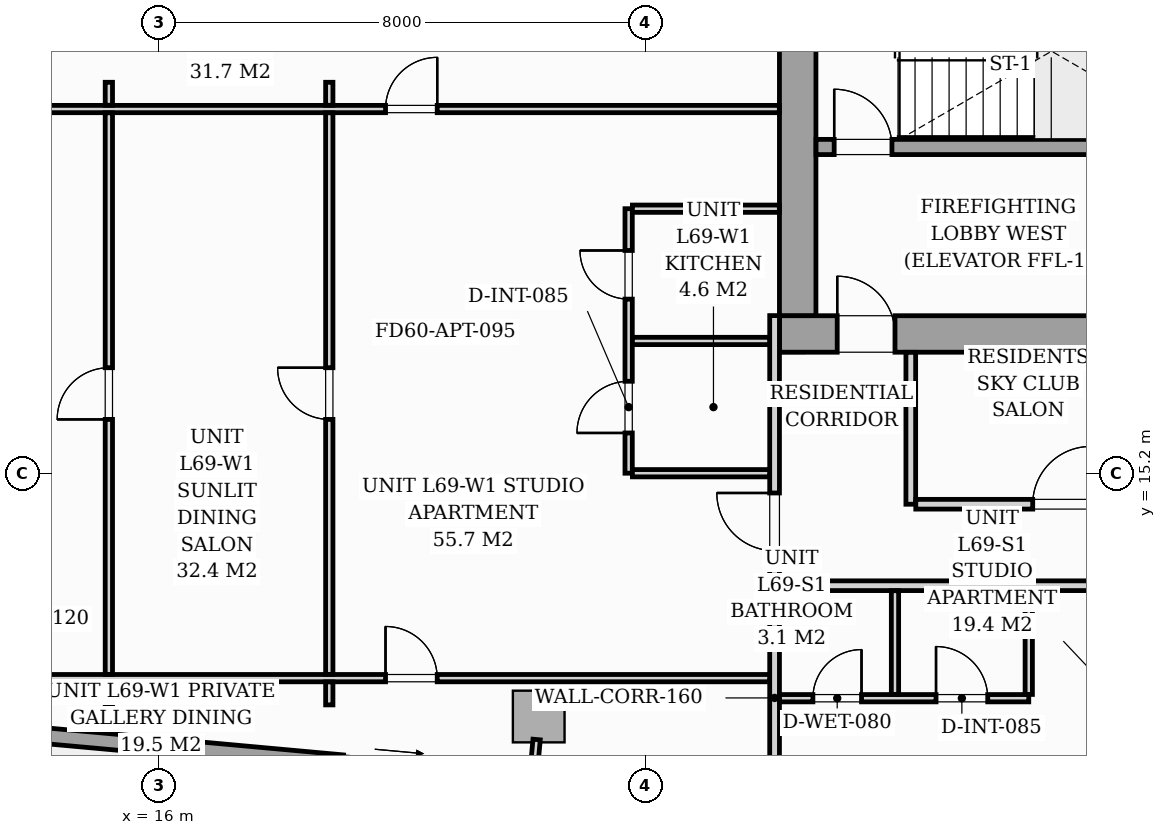
"""IFC4 building model, lengths in metres.
Left out: names, types, materials, properties, quantities, classifications, styles, units other than length and angle.
Written with IfcOpenShell. Run it as: python <this file> out.ifc"""

import sys

from ifc_helpers import new_model, si_unit, direction, frame, frame_2d, origin, origin_2d, place, context, subcontext, project, spatial, rectangle, i_section, extrude, source, transform, mapped, element, fill, save


model = new_model("IFC4")
c1 = context("Model", 3, precision=1e-05, world=origin(), true_north=direction((0.0, 1.0)))
c2 = subcontext(c1, "Body", "Model", "MODEL_VIEW")
j1 = project(units=[si_unit("LENGTHUNIT", "METRE"), si_unit("PLANEANGLEUNIT", "RADIAN")], contexts=[c1])
p1 = place(None, origin())
s1 = spatial("IfcSite", under=j1, at=p1, CompositionType="ELEMENT")
p2 = place(p1, origin())
s2 = spatial("IfcBuilding", under=s1, at=p2, CompositionType="ELEMENT")
p3 = place(p2, frame((0.0, 0.0, 239.7)))
s3 = spatial("IfcBuildingStorey", under=s2, at=p3, CompositionType="ELEMENT", Elevation=239.7)
m1 = source(origin(), c2, "Body", "SweptSolid", [
    extrude(i_section(OverallWidth=0.409, OverallDepth=0.425, WebThickness=0.033, FlangeThickness=0.052, FilletRadius=0.018, at=origin_2d()), origin(), (0.0, 0.0, 1.0), 3.296),
])
p4 = place(p3, frame((26.4, 17.4, 0.002), z_axis=(0.0, 0.0, 1.0), x_axis=(1.0, 0.0, 0.0)))
e1 = element("IfcColumn", 1, at=p4, inside=s3, PredefinedType="PILASTER", context=c2, shape_type="MappedRepresentation", body=[
    mapped(m1, transform((0.0, 0.0, 0.0), scale=1.0)),
])
m2 = source(origin(), c2, "Body", "SweptSolid", [
    extrude(rectangle(XDim=0.85, YDim=0.85, at=origin_2d()), origin(), (0.0, 0.0, 1.0), 3.296),
])
p5 = place(p3, frame((22.241, 11.209, 0.002), z_axis=(0.0, 0.0, 1.0), x_axis=(0.995884398616, -0.090632580198, 0.0)))
e2 = element("IfcColumn", 2, at=p5, inside=s3, PredefinedType="COLUMN", context=c2, shape_type="MappedRepresentation", body=[
    mapped(m2, transform((0.0, 0.0, 0.0), scale=1.0)),
])
p6 = place(p3, frame((25.761, 9.834, 0.0), z_axis=(0.0, 0.0, 1.0), x_axis=(-0.995884584572, 0.090630536861, 0.0)))
e3 = element("IfcWall", 3, at=p6, inside=s3, PredefinedType="STANDARD", context=c2, shape_type="SweptSolid", body=[
    extrude(rectangle(XDim=14.63, YDim=0.26, at=frame_2d((7.315, 0.0))), origin(), (0.0, 0.0, 1.0), 3.04),
])
p7 = place(p6, frame((4.97, 0.0, 0.0)))
e4 = element("IfcOpeningElement", 4, at=p7, cuts=e3, PredefinedType="OPENING", context=c2, shape_type="SweptSolid", body=[
    extrude(rectangle(XDim=1.8, YDim=2.06, at=frame_2d((0.9, 1.03))), frame((0.0, 0.14, 0.0), z_axis=(0.0, -1.0, 0.0), x_axis=(1.0, 0.0, 0.0)), (0.0, 0.0, 1.0), 0.28),
])
p8 = place(p6, frame((0.7, 0.0, 0.65)))
e5 = element("IfcOpeningElement", 5, at=p8, cuts=e3, PredefinedType="OPENING", context=c2, shape_type="SweptSolid", body=[
    extrude(rectangle(XDim=1.6, YDim=1.5, at=frame_2d((0.8, 0.75))), frame((0.0, 0.14, 0.0), z_axis=(0.0, -1.0, 0.0), x_axis=(1.0, 0.0, 0.0)), (0.0, 0.0, 1.0), 0.28),
])
p9 = place(p3, frame((26.2, 17.5, 0.0), z_axis=(0.0, 0.0, 1.0), x_axis=(1.0, 0.0, 0.0)))
e6 = element("IfcWall", 6, at=p9, inside=s3, PredefinedType="SHEAR", context=c2, shape_type="SweptSolid", body=[
    extrude(rectangle(XDim=19.6, YDim=0.6, at=frame_2d((9.8, 0.0))), origin(), (0.0, 0.0, 1.0), 3.3),
])
p10 = place(p9, frame((0.95, 0.0, 0.0)))
e7 = element("IfcOpeningElement", 7, at=p10, cuts=e6, PredefinedType="OPENING", context=c2, shape_type="SweptSolid", body=[
    extrude(rectangle(XDim=0.95, YDim=2.06, at=frame_2d((0.475, 1.03))), frame((0.0, 0.31, 0.0), z_axis=(0.0, -1.0, 0.0), x_axis=(1.0, 0.0, 0.0)), (0.0, 0.0, 1.0), 0.62),
])
p11 = place(p9, frame((9.38, 0.0, 0.0)))
e8 = element("IfcOpeningElement", 8, at=p11, cuts=e6, PredefinedType="OPENING", context=c2, shape_type="SweptSolid", body=[
    extrude(rectangle(XDim=0.85, YDim=2.0, at=frame_2d((0.425, 1.0))), frame((0.0, 0.31, 0.0), z_axis=(0.0, -1.0, 0.0), x_axis=(1.0, 0.0, 0.0)), (0.0, 0.0, 1.0), 0.62),
])
p12 = place(p9, frame((17.55, 0.0, 0.0)))
e9 = element("IfcOpeningElement", 9, at=p12, cuts=e6, PredefinedType="OPENING", context=c2, shape_type="SweptSolid", body=[
    extrude(rectangle(XDim=0.95, YDim=2.06, at=frame_2d((0.475, 1.03))), frame((0.0, 0.31, 0.0), z_axis=(0.0, -1.0, 0.0), x_axis=(1.0, 0.0, 0.0)), (0.0, 0.0, 1.0), 0.62),
])
p13 = place(p3, frame((26.5, 17.802, 0.0), z_axis=(0.0, 0.0, 1.0), x_axis=(0.0, 1.0, 0.0)))
e10 = element("IfcWall", 10, at=p13, inside=s3, PredefinedType="SHEAR", context=c2, shape_type="SweptSolid", body=[
    extrude(rectangle(XDim=5.796, YDim=0.6, at=frame_2d((2.898, 0.0))), origin(), (0.0, 0.0, 1.0), 3.3),
])
p14 = place(p3, frame((26.802, 20.575, 0.0), z_axis=(0.0, 0.0, 1.0), x_axis=(1.0, 0.0, 0.0)))
e11 = element("IfcWall", 11, at=p14, inside=s3, PredefinedType="SOLIDWALL", context=c2, shape_type="SweptSolid", body=[
    extrude(rectangle(XDim=8.148, YDim=0.25, at=frame_2d((4.074, 0.0))), origin(), (0.0, 0.0, 1.0), 3.3),
])
p15 = place(p14, frame((0.298, 0.0, 0.0)))
e12 = element("IfcOpeningElement", 12, at=p15, cuts=e11, PredefinedType="OPENING", context=c2, shape_type="SweptSolid", body=[
    extrude(rectangle(XDim=0.95, YDim=2.06, at=frame_2d((0.475, 1.03))), frame((0.0, 0.135, 0.0), z_axis=(0.0, -1.0, 0.0), x_axis=(1.0, 0.0, 0.0)), (0.0, 0.0, 1.0), 0.27),
])
p16 = place(p3, frame((26.12, 13.36, 0.0), z_axis=(0.0, 0.0, 1.0), x_axis=(1.0, 0.0, 0.0)))
e13 = element("IfcWall", 13, at=p16, inside=s3, PredefinedType="PARTITIONING", context=c2, shape_type="SweptSolid", body=[
    extrude(rectangle(XDim=19.76, YDim=0.16, at=frame_2d((9.88, 0.0))), origin(), (0.0, 0.0, 1.0), 2.605),
])
p17 = place(p16, frame((5.221, 0.0, 0.0)))
e14 = element("IfcOpeningElement", 14, at=p17, cuts=e13, PredefinedType="OPENING", context=c2, shape_type="SweptSolid", body=[
    extrude(rectangle(XDim=0.95, YDim=2.06, at=frame_2d((0.475, 1.03))), frame((0.0, 0.09, 0.0), z_axis=(0.0, -1.0, 0.0), x_axis=(1.0, 0.0, 0.0)), (0.0, 0.0, 1.0), 0.18),
])
p18 = place(p16, frame((8.074, 0.0, 0.0)))
e15 = element("IfcOpeningElement", 15, at=p18, cuts=e13, PredefinedType="OPENING", context=c2, shape_type="SweptSolid", body=[
    extrude(rectangle(XDim=0.95, YDim=2.06, at=frame_2d((0.475, 1.03))), frame((0.0, 0.09, 0.0), z_axis=(0.0, -1.0, 0.0), x_axis=(1.0, 0.0, 0.0)), (0.0, 0.0, 1.0), 0.18),
])
p19 = place(p16, frame((18.17, 0.0, 0.0)))
e16 = element("IfcOpeningElement", 16, at=p19, cuts=e13, PredefinedType="OPENING", context=c2, shape_type="SweptSolid", body=[
    extrude(rectangle(XDim=0.95, YDim=2.06, at=frame_2d((0.475, 1.03))), frame((0.0, 0.09, 0.0), z_axis=(0.0, -1.0, 0.0), x_axis=(1.0, 0.0, 0.0)), (0.0, 0.0, 1.0), 0.18),
])
p20 = place(p3, frame((26.12, 9.751, 0.0), z_axis=(0.0, 0.0, 1.0), x_axis=(0.0, 1.0, 0.0)))
e17 = element("IfcWall", 17, at=p20, inside=s3, PredefinedType="PARTITIONING", context=c2, shape_type="SweptSolid", body=[
    extrude(rectangle(XDim=3.527, YDim=0.16, at=frame_2d((1.763, 0.0))), origin(), (0.0, 0.0, 1.0), 3.04),
])
p21 = place(p3, frame((26.12, 13.442, 0.0), z_axis=(0.0, 0.0, 1.0), x_axis=(0.0, 1.0, 0.0)))
e18 = element("IfcWall", 18, at=p21, inside=s3, PredefinedType="PARTITIONING", context=c2, shape_type="SweptSolid", body=[
    extrude(rectangle(XDim=4.36, YDim=0.16, at=frame_2d((2.18, 0.0))), origin(), (0.0, 0.0, 1.0), 3.04),
])
p22 = place(p21, frame((0.493, 0.0, 0.0)))
e19 = element("IfcOpeningElement", 19, at=p22, cuts=e18, PredefinedType="OPENING", context=c2, shape_type="SweptSolid", body=[
    extrude(rectangle(XDim=0.95, YDim=2.06, at=frame_2d((0.475, 1.03))), frame((0.0, 0.09, 0.0), z_axis=(0.0, -1.0, 0.0), x_axis=(1.0, 0.0, 0.0)), (0.0, 0.0, 1.0), 0.18),
])
p23 = place(p3, frame((26.202, 11.51, 0.0), z_axis=(0.0, 0.0, 1.0), x_axis=(1.0, 0.0, 0.0)))
e20 = element("IfcWall", 20, at=p23, inside=s3, PredefinedType="PARTITIONING", context=c2, shape_type="SweptSolid", body=[
    extrude(rectangle(XDim=4.098, YDim=0.12, at=frame_2d((2.049, 0.0))), origin(), (0.0, 0.0, 1.0), 2.605),
])
p24 = place(p23, frame((0.548, 0.0, 0.0)))
e21 = element("IfcOpeningElement", 21, at=p24, cuts=e20, PredefinedType="OPENING", context=c2, shape_type="SweptSolid", body=[
    extrude(rectangle(XDim=0.8, YDim=2.02, at=frame_2d((0.4, 1.01))), frame((0.0, 0.07, 0.0), z_axis=(0.0, -1.0, 0.0), x_axis=(1.0, 0.0, 0.0)), (0.0, 0.0, 1.0), 0.14),
])
p25 = place(p23, frame((2.573, 0.0, 0.0)))
e22 = element("IfcOpeningElement", 22, at=p25, cuts=e20, PredefinedType="OPENING", context=c2, shape_type="SweptSolid", body=[
    extrude(rectangle(XDim=0.85, YDim=2.05, at=frame_2d((0.425, 1.025))), frame((0.0, 0.07, 0.0), z_axis=(0.0, -1.0, 0.0), x_axis=(1.0, 0.0, 0.0)), (0.0, 0.0, 1.0), 0.14),
])
for number, where, z_axis, x_axis in (
    (23, (30.3, 11.572, 0.0), (0.0, 0.0, 1.0), (0.0, 1.0, 0.0)),
    (24, (28.1, 11.572, 0.0), (0.0, 0.0, 1.0), (0.0, 1.0, 0.0)),
):
    element("IfcWall", number, at=place(p3, frame(where, z_axis=z_axis, x_axis=x_axis)), inside=s3, PredefinedType="PARTITIONING", context=c2, shape_type="SweptSolid", body=[
        extrude(rectangle(XDim=1.706, YDim=0.12, at=frame_2d((0.853, 0.0))), origin(), (0.0, 0.0, 1.0), 3.04),
    ])
p26 = place(p3, frame((23.72, 15.21, 0.0), z_axis=(0.0, 0.0, 1.0), x_axis=(0.0, 1.0, 0.0)))
e25 = element("IfcWall", 25, at=p26, inside=s3, PredefinedType="PARTITIONING", context=c2, shape_type="SweptSolid", body=[
    extrude(rectangle(XDim=4.35, YDim=0.12, at=frame_2d((2.175, 0.0))), origin(), (0.0, 0.0, 1.0), 3.04),
])
p27 = place(p26, frame((0.662, 0.0, 0.0)))
e26 = element("IfcOpeningElement", 26, at=p27, cuts=e25, PredefinedType="OPENING", context=c2, shape_type="SweptSolid", body=[
    extrude(rectangle(XDim=0.85, YDim=2.05, at=frame_2d((0.425, 1.025))), frame((0.0, 0.07, 0.0), z_axis=(0.0, -1.0, 0.0), x_axis=(1.0, 0.0, 0.0)), (0.0, 0.0, 1.0), 0.14),
])
p28 = place(p26, frame((2.863, 0.0, 0.0)))
e27 = element("IfcOpeningElement", 27, at=p28, cuts=e25, PredefinedType="OPENING", context=c2, shape_type="SweptSolid", body=[
    extrude(rectangle(XDim=0.8, YDim=2.02, at=frame_2d((0.4, 1.01))), frame((0.0, 0.07, 0.0), z_axis=(0.0, -1.0, 0.0), x_axis=(1.0, 0.0, 0.0)), (0.0, 0.0, 1.0), 0.14),
])
p29 = place(p3, frame((23.782, 17.385, 0.0), z_axis=(0.0, 0.0, 1.0), x_axis=(1.0, 0.0, 0.0)))
e28 = element("IfcWall", 28, at=p29, inside=s3, PredefinedType="PARTITIONING", context=c2, shape_type="SweptSolid", body=[
    extrude(rectangle(XDim=2.256, YDim=0.12, at=frame_2d((1.128, 0.0))), origin(), (0.0, 0.0, 1.0), 2.381),
])
p30 = place(p3, frame((23.782, 15.21, 0.0), z_axis=(0.0, 0.0, 1.0), x_axis=(1.0, 0.0, 0.0)))
e29 = element("IfcWall", 29, at=p30, inside=s3, PredefinedType="PARTITIONING", context=c2, shape_type="SweptSolid", body=[
    extrude(rectangle(XDim=2.256, YDim=0.12, at=frame_2d((1.128, 0.0))), origin(), (0.0, 0.0, 1.0), 3.04),
])
p31 = place(p3, frame((23.782, 19.56, 0.0), z_axis=(0.0, 0.0, 1.0), x_axis=(1.0, 0.0, 0.0)))
e30 = element("IfcWall", 30, at=p31, inside=s3, PredefinedType="PARTITIONING", context=c2, shape_type="SweptSolid", body=[
    extrude(rectangle(XDim=2.416, YDim=0.12, at=frame_2d((1.208, 0.0))), origin(), (0.0, 0.0, 1.0), 3.04),
])
p32 = place(p3, frame((11.516, 11.84, 0.0), z_axis=(0.0, 0.0, 1.0), x_axis=(1.0, 0.0, 0.0)))
e31 = element("IfcWall", 31, at=p32, inside=s3, PredefinedType="PARTITIONING", context=c2, shape_type="SweptSolid", body=[
    extrude(rectangle(XDim=14.522, YDim=0.12, at=frame_2d((7.261, 0.0))), origin(), (0.0, 0.0, 1.0), 2.483),
])
p33 = place(p32, frame((8.206, 0.0, 0.0)))
e32 = element("IfcOpeningElement", 32, at=p33, cuts=e31, PredefinedType="OPENING", context=c2, shape_type="SweptSolid", body=[
    extrude(rectangle(XDim=0.85, YDim=2.05, at=frame_2d((0.425, 1.025))), frame((0.0, 0.07, 0.0), z_axis=(0.0, -1.0, 0.0), x_axis=(1.0, 0.0, 0.0)), (0.0, 0.0, 1.0), 0.14),
])
p34 = place(p3, frame((9.675, 21.199, 0.0), z_axis=(0.0, 0.0, 1.0), x_axis=(1.0, 0.0, 0.0)))
e33 = element("IfcWall", 33, at=p34, inside=s3, PredefinedType="PARTITIONING", context=c2, shape_type="SweptSolid", body=[
    extrude(rectangle(XDim=16.523, YDim=0.12, at=frame_2d((8.262, 0.0))), origin(), (0.0, 0.0, 1.0), 3.04),
])
p35 = place(p34, frame((10.047, 0.0, 0.0)))
e34 = element("IfcOpeningElement", 34, at=p35, cuts=e33, PredefinedType="OPENING", context=c2, shape_type="SweptSolid", body=[
    extrude(rectangle(XDim=0.85, YDim=2.05, at=frame_2d((0.425, 1.025))), frame((0.0, 0.07, 0.0), z_axis=(0.0, -1.0, 0.0), x_axis=(1.0, 0.0, 0.0)), (0.0, 0.0, 1.0), 0.14),
])
p36 = place(p3, frame((15.172, 11.4, 0.0), z_axis=(0.0, 0.0, 1.0), x_axis=(0.0, 1.0, 0.0)))
e35 = element("IfcWall", 35, at=p36, inside=s3, PredefinedType="PARTITIONING", context=c2, shape_type="SweptSolid", body=[
    extrude(rectangle(XDim=0.378, YDim=0.12, at=frame_2d((0.189, 0.0))), origin(), (0.0, 0.0, 1.0), 3.04),
])
p37 = place(p3, frame((15.172, 11.902, 0.0), z_axis=(0.0, 0.0, 1.0), x_axis=(0.0, 1.0, 0.0)))
e36 = element("IfcWall", 36, at=p37, inside=s3, PredefinedType="PARTITIONING", context=c2, shape_type="SweptSolid", body=[
    extrude(rectangle(XDim=9.235, YDim=0.12, at=frame_2d((4.617, 0.0))), origin(), (0.0, 0.0, 1.0), 3.04),
])
p38 = place(p37, frame((4.193, 0.0, 0.0)))
e37 = element("IfcOpeningElement", 37, at=p38, cuts=e36, PredefinedType="OPENING", context=c2, shape_type="SweptSolid", body=[
    extrude(rectangle(XDim=0.85, YDim=2.05, at=frame_2d((0.425, 1.025))), frame((0.0, 0.07, 0.0), z_axis=(0.0, -1.0, 0.0), x_axis=(1.0, 0.0, 0.0)), (0.0, 0.0, 1.0), 0.14),
])
p39 = place(p3, frame((15.172, 21.261, 0.0), z_axis=(0.0, 0.0, 1.0), x_axis=(0.0, 1.0, 0.0)))
e38 = element("IfcWall", 38, at=p39, inside=s3, PredefinedType="PARTITIONING", context=c2, shape_type="SweptSolid", body=[
    extrude(rectangle(XDim=0.378, YDim=0.12, at=frame_2d((0.189, 0.0))), origin(), (0.0, 0.0, 1.0), 3.04),
])
p40 = place(p3, frame((18.797, 11.4, 0.0), z_axis=(0.0, 0.0, 1.0), x_axis=(0.0, 1.0, 0.0)))
e39 = element("IfcWall", 39, at=p40, inside=s3, PredefinedType="PARTITIONING", context=c2, shape_type="SweptSolid", body=[
    extrude(rectangle(XDim=0.378, YDim=0.12, at=frame_2d((0.189, 0.0))), origin(), (0.0, 0.0, 1.0), 3.04),
])
p41 = place(p3, frame((18.797, 11.902, 0.0), z_axis=(0.0, 0.0, 1.0), x_axis=(0.0, 1.0, 0.0)))
e40 = element("IfcWall", 40, at=p41, inside=s3, PredefinedType="PARTITIONING", context=c2, shape_type="SweptSolid", body=[
    extrude(rectangle(XDim=9.235, YDim=0.12, at=frame_2d((4.617, 0.0))), origin(), (0.0, 0.0, 1.0), 3.04),
])
p42 = place(p41, frame((4.193, 0.0, 0.0)))
e41 = element("IfcOpeningElement", 41, at=p42, cuts=e40, PredefinedType="OPENING", context=c2, shape_type="SweptSolid", body=[
    extrude(rectangle(XDim=0.85, YDim=2.05, at=frame_2d((0.425, 1.025))), frame((0.0, 0.07, 0.0), z_axis=(0.0, -1.0, 0.0), x_axis=(1.0, 0.0, 0.0)), (0.0, 0.0, 1.0), 0.14),
])
p43 = place(p3, frame((18.797, 21.261, 0.0), z_axis=(0.0, 0.0, 1.0), x_axis=(0.0, 1.0, 0.0)))
e42 = element("IfcWall", 42, at=p43, inside=s3, PredefinedType="PARTITIONING", context=c2, shape_type="SweptSolid", body=[
    extrude(rectangle(XDim=0.378, YDim=0.12, at=frame_2d((0.189, 0.0))), origin(), (0.0, 0.0, 1.0), 3.04),
])
p44 = place(p3, frame((28.36, 14.7, 0.0), z_axis=(0.0, 0.0, 1.0), x_axis=(0.0, 1.0, 0.0)))
e43 = element("IfcWall", 43, at=p44, inside=s3, PredefinedType="PARTITIONING", context=c2, shape_type="SweptSolid", body=[
    extrude(rectangle(XDim=2.498, YDim=0.16, at=frame_2d((1.249, 0.0))), origin(), (0.0, 0.0, 1.0), 3.04),
])
p45 = place(p3, frame((28.442, 14.7, 0.0), z_axis=(0.0, 0.0, 1.0), x_axis=(1.0, 0.0, 0.0)))
e44 = element("IfcWall", 44, at=p45, inside=s3, PredefinedType="PARTITIONING", context=c2, shape_type="SweptSolid", body=[
    extrude(rectangle(XDim=4.796, YDim=0.16, at=frame_2d((2.398, 0.0))), origin(), (0.0, 0.0, 1.0), 2.605),
])
p46 = place(p45, frame((1.923, 0.0, 0.0)))
e45 = element("IfcOpeningElement", 45, at=p46, cuts=e44, PredefinedType="OPENING", context=c2, shape_type="SweptSolid", body=[
    extrude(rectangle(XDim=0.95, YDim=2.06, at=frame_2d((0.475, 1.03))), frame((0.0, 0.09, 0.0), z_axis=(0.0, -1.0, 0.0), x_axis=(1.0, 0.0, 0.0)), (0.0, 0.0, 1.0), 0.18),
])
p47 = place(p3, frame((22.207, 10.831, 0.0), z_axis=(0.0, 0.0, 1.0), x_axis=(-0.090781299264, -0.995870852924, 0.0)))
e46 = element("IfcWall", 46, at=p47, inside=s3, PredefinedType="PARTITIONING", context=c2, shape_type="SweptSolid", body=[
    extrude(rectangle(XDim=0.538, YDim=0.12, at=frame_2d((0.269, 0.0))), origin(), (0.0, 0.0, 1.0), 3.04),
])
m3 = source(origin(), c2, "Body", "SweptSolid", [
    extrude(rectangle(XDim=0.95, YDim=2.06, at=frame_2d((0.475, 1.03))), frame((0.0, 0.025, 0.0), z_axis=(0.0, -1.0, 0.0), x_axis=(1.0, 0.0, 0.0)), (0.0, 0.0, 1.0), 0.05),
])
p48 = place(p10, origin())
e47 = element("IfcDoor", 47, at=p48, inside=s3, OperationType="SINGLE_SWING_LEFT", PredefinedType="DOOR", context=c2, shape_type="MappedRepresentation", body=[
    mapped(m3, transform((0.0, 0.0, 0.0), scale=1.0)),
])
fill(e7, e47)
p49 = place(p15, origin())
e48 = element("IfcDoor", 48, at=p49, inside=s3, OperationType="SINGLE_SWING_LEFT", PredefinedType="DOOR", context=c2, shape_type="MappedRepresentation", body=[
    mapped(m3, transform((0.0, 0.0, 0.0), scale=1.0)),
])
fill(e12, e48)
m4 = source(origin(), c2, "Body", "SweptSolid", [
    extrude(rectangle(XDim=0.8, YDim=2.02, at=frame_2d((0.4, 1.01))), frame((0.0, 0.025, 0.0), z_axis=(0.0, -1.0, 0.0), x_axis=(1.0, 0.0, 0.0)), (0.0, 0.0, 1.0), 0.05),
])
p50 = place(p24, origin())
e49 = element("IfcDoor", 49, at=p50, inside=s3, OperationType="SINGLE_SWING_RIGHT", PredefinedType="DOOR", context=c2, shape_type="MappedRepresentation", body=[
    mapped(m4, transform((0.0, 0.0, 0.0), scale=1.0)),
])
fill(e21, e49)
m5 = source(origin(), c2, "Body", "SweptSolid", [
    extrude(rectangle(XDim=0.85, YDim=2.05, at=frame_2d((0.425, 1.025))), frame((0.0, 0.025, 0.0), z_axis=(0.0, -1.0, 0.0), x_axis=(1.0, 0.0, 0.0)), (0.0, 0.0, 1.0), 0.05),
])
p51 = place(p25, origin())
e50 = element("IfcDoor", 50, at=p51, inside=s3, OperationType="SINGLE_SWING_LEFT", PredefinedType="DOOR", context=c2, shape_type="MappedRepresentation", body=[
    mapped(m5, transform((0.0, 0.0, 0.0), scale=1.0)),
])
fill(e22, e50)
m6 = source(origin(), c2, "Body", "SweptSolid", [
    extrude(rectangle(XDim=0.95, YDim=2.06, at=frame_2d((0.475, 1.03))), frame((0.0, 0.025, 0.0), z_axis=(0.0, -1.0, 0.0), x_axis=(1.0, 0.0, 0.0)), (0.0, 0.0, 1.0), 0.05),
])
p52 = place(p22, origin())
e51 = element("IfcDoor", 51, at=p52, inside=s3, OperationType="SINGLE_SWING_RIGHT", PredefinedType="DOOR", context=c2, shape_type="MappedRepresentation", body=[
    mapped(m6, transform((0.0, 0.0, 0.0), scale=1.0)),
])
fill(e19, e51)
p53 = place(p27, origin())
e52 = element("IfcDoor", 52, at=p53, inside=s3, OperationType="SINGLE_SWING_LEFT", PredefinedType="DOOR", context=c2, shape_type="MappedRepresentation", body=[
    mapped(m5, transform((0.0, 0.0, 0.0), scale=1.0)),
])
fill(e26, e52)
p54 = place(p28, origin())
e53 = element("IfcDoor", 53, at=p54, inside=s3, OperationType="SINGLE_SWING_RIGHT", PredefinedType="DOOR", context=c2, shape_type="MappedRepresentation", body=[
    mapped(m4, transform((0.0, 0.0, 0.0), scale=1.0)),
])
fill(e27, e53)
p55 = place(p33, origin())
e54 = element("IfcDoor", 54, at=p55, inside=s3, OperationType="SINGLE_SWING_LEFT", PredefinedType="DOOR", context=c2, shape_type="MappedRepresentation", body=[
    mapped(m5, transform((0.0, 0.0, 0.0), scale=1.0)),
])
fill(e32, e54)
p56 = place(p35, origin())
e55 = element("IfcDoor", 55, at=p56, inside=s3, OperationType="SINGLE_SWING_RIGHT", PredefinedType="DOOR", context=c2, shape_type="MappedRepresentation", body=[
    mapped(m5, transform((0.0, 0.0, 0.0), scale=1.0)),
])
fill(e34, e55)
p57 = place(p38, origin())
e56 = element("IfcDoor", 56, at=p57, inside=s3, OperationType="SINGLE_SWING_LEFT", PredefinedType="DOOR", context=c2, shape_type="MappedRepresentation", body=[
    mapped(m5, transform((0.0, 0.0, 0.0), scale=1.0)),
])
fill(e37, e56)
p58 = place(p42, origin())
e57 = element("IfcDoor", 57, at=p58, inside=s3, OperationType="SINGLE_SWING_RIGHT", PredefinedType="DOOR", context=c2, shape_type="MappedRepresentation", body=[
    mapped(m5, transform((0.0, 0.0, 0.0), scale=1.0)),
])
fill(e41, e57)
p59 = place(p46, origin())
e58 = element("IfcDoor", 58, at=p59, inside=s3, OperationType="SINGLE_SWING_RIGHT", PredefinedType="DOOR", context=c2, shape_type="MappedRepresentation", body=[
    mapped(m6, transform((0.0, 0.0, 0.0), scale=1.0)),
])
fill(e45, e58)
save(model, sys.argv[1])
